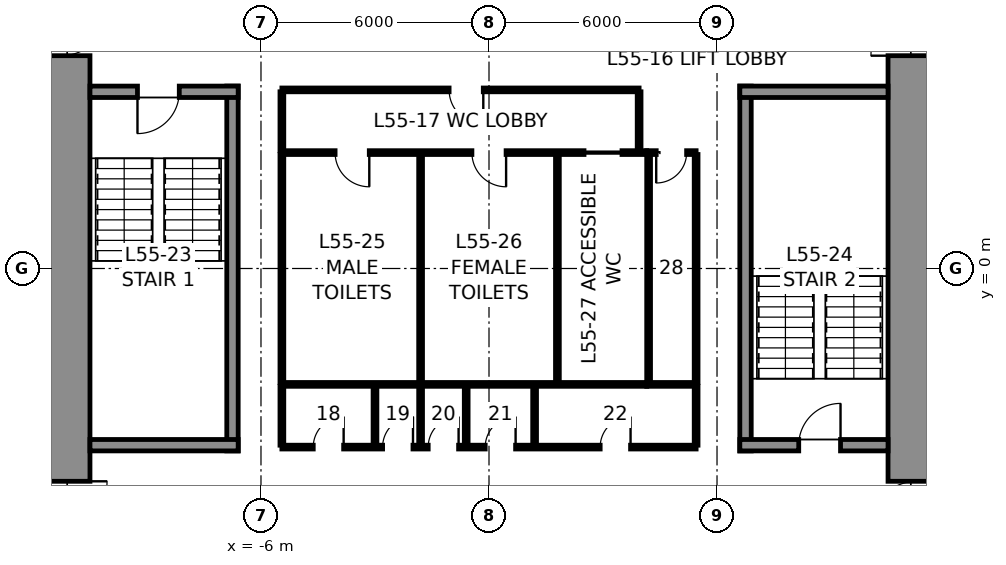
"""IFC4 building model, lengths in metres.
Left out: names, types, materials, properties, quantities, classifications, styles, units other than length and angle.
Written with IfcOpenShell. Run it as: python <this file> out.ifc"""

import sys

from ifc_helpers import new_model, si_unit, direction, frame, frame_2d, origin, place, context, subcontext, project, spatial, rectangle, extrude, element, fill, save


model = new_model("IFC4")
c1 = context("Model", 3, precision=1e-05, world=origin(), true_north=direction((0.0, 1.0)))
c2 = subcontext(c1, "Body", "Model", "MODEL_VIEW")
j1 = project(units=[si_unit("LENGTHUNIT", "METRE"), si_unit("PLANEANGLEUNIT", "RADIAN")], contexts=[c1])
p1 = place(None, origin())
s1 = spatial("IfcSite", under=j1, at=p1, CompositionType="ELEMENT")
p2 = place(p1, origin())
s2 = spatial("IfcBuilding", under=s1, at=p2, CompositionType="ELEMENT")
p3 = place(p2, frame((0.0, 0.0, 249.8)))
s3 = spatial("IfcBuildingStorey", under=s2, at=p3, CompositionType="ELEMENT", Elevation=249.8)
p4 = place(p3, frame((11.25, 10.5, 0.0), z_axis=(0.0, 0.0, 1.0), x_axis=(0.0, -1.0, 0.0)))
e1 = element("IfcWall", 1, at=p4, inside=s3, PredefinedType="SHEAR", context=c2, shape_type="SweptSolid", body=[
    extrude(rectangle(XDim=21.0, YDim=1.5, at=frame_2d((10.5, 0.0))), origin(), (0.0, 0.0, 1.0), 4.0),
])
p5 = place(p4, frame((3.7, 0.0, 0.0)))
e2 = element("IfcOpeningElement", 2, at=p5, cuts=e1, PredefinedType="OPENING", context=c2, shape_type="SweptSolid", body=[
    extrude(rectangle(XDim=1.2, YDim=2.3, at=frame_2d((0.6, 1.15))), frame((0.0, 0.76, 0.0), z_axis=(0.0, -1.0, 0.0), x_axis=(1.0, 0.0, 0.0)), (0.0, 0.0, 1.0), 1.52),
])
p6 = place(p4, frame((16.1, 0.0, 0.0)))
e3 = element("IfcOpeningElement", 3, at=p6, cuts=e1, PredefinedType="OPENING", context=c2, shape_type="SweptSolid", body=[
    extrude(rectangle(XDim=1.2, YDim=2.3, at=frame_2d((0.6, 1.15))), frame((0.0, 0.76, 0.0), z_axis=(0.0, -1.0, 0.0), x_axis=(1.0, 0.0, 0.0)), (0.0, 0.0, 1.0), 1.52),
])
p7 = place(p3, frame((-11.25, -10.5, 0.0), z_axis=(0.0, 0.0, 1.0), x_axis=(0.0, 1.0, 0.0)))
e4 = element("IfcWall", 4, at=p7, inside=s3, PredefinedType="SHEAR", context=c2, shape_type="SweptSolid", body=[
    extrude(rectangle(XDim=21.0, YDim=1.5, at=frame_2d((10.5, 0.0))), origin(), (0.0, 0.0, 1.0), 4.0),
])
p8 = place(p7, frame((16.1, 0.0, 0.0)))
e5 = element("IfcOpeningElement", 5, at=p8, cuts=e4, PredefinedType="OPENING", context=c2, shape_type="SweptSolid", body=[
    extrude(rectangle(XDim=1.2, YDim=2.3, at=frame_2d((0.6, 1.15))), frame((0.0, 0.76, 0.0), z_axis=(0.0, -1.0, 0.0), x_axis=(1.0, 0.0, 0.0)), (0.0, 0.0, 1.0), 1.52),
])
p9 = place(p7, frame((3.7, 0.0, 0.0)))
e6 = element("IfcOpeningElement", 6, at=p9, cuts=e4, PredefinedType="OPENING", context=c2, shape_type="SweptSolid", body=[
    extrude(rectangle(XDim=1.2, YDim=2.3, at=frame_2d((0.6, 1.15))), frame((0.0, 0.76, 0.0), z_axis=(0.0, -1.0, 0.0), x_axis=(1.0, 0.0, 0.0)), (0.0, 0.0, 1.0), 1.52),
])
p10 = place(p3, frame((-6.75, -4.8, 0.0), z_axis=(0.0, 0.0, 1.0), x_axis=(0.0, 1.0, 0.0)))
e7 = element("IfcWall", 7, at=p10, inside=s3, PredefinedType="SOLIDWALL", context=c2, shape_type="SweptSolid", body=[
    extrude(rectangle(XDim=9.6, YDim=0.3, at=frame_2d((4.8, 0.0))), origin(), (0.0, 0.0, 1.0), 3.75),
])
p11 = place(p3, frame((-10.5, 4.65, 0.0), z_axis=(0.0, 0.0, 1.0), x_axis=(1.0, 0.0, 0.0)))
e8 = element("IfcWall", 8, at=p11, inside=s3, PredefinedType="SOLIDWALL", context=c2, shape_type="SweptSolid", body=[
    extrude(rectangle(XDim=3.9, YDim=0.3, at=frame_2d((1.95, 0.0))), origin(), (0.0, 0.0, 1.0), 3.75),
])
p12 = place(p11, frame((1.25, 0.0, 0.0)))
e9 = element("IfcOpeningElement", 9, at=p12, cuts=e8, PredefinedType="OPENING", context=c2, shape_type="SweptSolid", body=[
    extrude(rectangle(XDim=1.1, YDim=2.3, at=frame_2d((0.55, 1.15))), frame((0.0, 0.16, 0.0), z_axis=(0.0, -1.0, 0.0), x_axis=(1.0, 0.0, 0.0)), (0.0, 0.0, 1.0), 0.32),
])
p13 = place(p3, frame((-6.6, -4.65, 0.0), z_axis=(0.0, 0.0, 1.0), x_axis=(-1.0, 0.0, 0.0)))
e10 = element("IfcWall", 10, at=p13, inside=s3, PredefinedType="SOLIDWALL", context=c2, shape_type="SweptSolid", body=[
    extrude(rectangle(XDim=3.9, YDim=0.3, at=frame_2d((1.95, 0.0))), origin(), (0.0, 0.0, 1.0), 3.75),
])
p14 = place(p3, frame((6.75, -4.8, 0.0), z_axis=(0.0, 0.0, 1.0), x_axis=(0.0, 1.0, 0.0)))
e11 = element("IfcWall", 11, at=p14, inside=s3, PredefinedType="SOLIDWALL", context=c2, shape_type="SweptSolid", body=[
    extrude(rectangle(XDim=9.6, YDim=0.3, at=frame_2d((4.8, 0.0))), origin(), (0.0, 0.0, 1.0), 3.75),
])
p15 = place(p3, frame((6.6, 4.65, 0.0), z_axis=(0.0, 0.0, 1.0), x_axis=(1.0, 0.0, 0.0)))
e12 = element("IfcWall", 12, at=p15, inside=s3, PredefinedType="SOLIDWALL", context=c2, shape_type="SweptSolid", body=[
    extrude(rectangle(XDim=3.9, YDim=0.3, at=frame_2d((1.95, 0.0))), origin(), (0.0, 0.0, 1.0), 3.75),
])
p16 = place(p3, frame((10.5, -4.65, 0.0), z_axis=(0.0, 0.0, 1.0), x_axis=(-1.0, 0.0, 0.0)))
e13 = element("IfcWall", 13, at=p16, inside=s3, PredefinedType="SOLIDWALL", context=c2, shape_type="SweptSolid", body=[
    extrude(rectangle(XDim=3.9, YDim=0.3, at=frame_2d((1.95, 0.0))), origin(), (0.0, 0.0, 1.0), 3.75),
])
p17 = place(p16, frame((1.25, 0.0, 0.0)))
e14 = element("IfcOpeningElement", 14, at=p17, cuts=e13, PredefinedType="OPENING", context=c2, shape_type="SweptSolid", body=[
    extrude(rectangle(XDim=1.1, YDim=2.3, at=frame_2d((0.55, 1.15))), frame((0.0, 0.16, 0.0), z_axis=(0.0, -1.0, 0.0), x_axis=(1.0, 0.0, 0.0)), (0.0, 0.0, 1.0), 0.32),
])
p18 = place(p3, frame((-5.45, 3.05, 0.0), z_axis=(0.0, 0.0, 1.0), x_axis=(1.0, 0.0, 0.0)))
e15 = element("IfcWall", 15, at=p18, inside=s3, PredefinedType="PARTITIONING", context=c2, shape_type="SweptSolid", body=[
    extrude(rectangle(XDim=9.6, YDim=0.1, at=frame_2d((4.8, 0.0))), origin(), (0.0, 0.0, 1.0), 3.75),
])
p19 = place(p18, frame((1.4, 0.0, 0.0)))
e16 = element("IfcOpeningElement", 16, at=p19, cuts=e15, PredefinedType="OPENING", context=c2, shape_type="SweptSolid", body=[
    extrude(rectangle(XDim=0.9, YDim=2.3, at=frame_2d((0.45, 1.15))), frame((0.0, 0.06, 0.0), z_axis=(0.0, -1.0, 0.0), x_axis=(1.0, 0.0, 0.0)), (0.0, 0.0, 1.0), 0.12),
])
p20 = place(p18, frame((5.0, 0.0, 0.0)))
e17 = element("IfcOpeningElement", 17, at=p20, cuts=e15, PredefinedType="OPENING", context=c2, shape_type="SweptSolid", body=[
    extrude(rectangle(XDim=0.9, YDim=2.3, at=frame_2d((0.45, 1.15))), frame((0.0, 0.06, 0.0), z_axis=(0.0, -1.0, 0.0), x_axis=(1.0, 0.0, 0.0)), (0.0, 0.0, 1.0), 0.12),
])
p21 = place(p18, frame((7.95, 0.0, 0.0)))
e18 = element("IfcOpeningElement", 18, at=p21, cuts=e15, PredefinedType="OPENING", context=c2, shape_type="SweptSolid", body=[
    extrude(rectangle(XDim=1.0, YDim=2.3, at=frame_2d((0.5, 1.15))), frame((0.0, 0.06, 0.0), z_axis=(0.0, -1.0, 0.0), x_axis=(1.0, 0.0, 0.0)), (0.0, 0.0, 1.0), 0.12),
])
p22 = place(p3, frame((4.15, 3.05, 0.0), z_axis=(0.0, 0.0, 1.0), x_axis=(1.0, 0.0, 0.0)))
e19 = element("IfcWall", 19, at=p22, inside=s3, PredefinedType="PARTITIONING", context=c2, shape_type="SweptSolid", body=[
    extrude(rectangle(XDim=1.3, YDim=0.1, at=frame_2d((0.65, 0.0))), origin(), (0.0, 0.0, 1.0), 3.75),
])
p23 = place(p22, frame((0.25, 0.0, 0.0)))
e20 = element("IfcOpeningElement", 20, at=p23, cuts=e19, PredefinedType="OPENING", context=c2, shape_type="SweptSolid", body=[
    extrude(rectangle(XDim=0.8, YDim=2.3, at=frame_2d((0.4, 1.15))), frame((0.0, 0.06, 0.0), z_axis=(0.0, -1.0, 0.0), x_axis=(1.0, 0.0, 0.0)), (0.0, 0.0, 1.0), 0.12),
])
p24 = place(p3, frame((4.15, -3.05, 0.0), z_axis=(0.0, 0.0, 1.0), x_axis=(-1.0, 0.0, 0.0)))
e21 = element("IfcWall", 21, at=p24, inside=s3, PredefinedType="PARTITIONING", context=c2, shape_type="SweptSolid", body=[
    extrude(rectangle(XDim=9.6, YDim=0.1, at=frame_2d((4.8, 0.0))), origin(), (0.0, 0.0, 1.0), 3.75),
])
p25 = place(p3, frame((5.45, -3.05, 0.0), z_axis=(0.0, 0.0, 1.0), x_axis=(-1.0, 0.0, 0.0)))
e22 = element("IfcWall", 22, at=p25, inside=s3, PredefinedType="PARTITIONING", context=c2, shape_type="SweptSolid", body=[
    extrude(rectangle(XDim=1.3, YDim=0.1, at=frame_2d((0.65, 0.0))), origin(), (0.0, 0.0, 1.0), 3.75),
])
for number, where, z_axis, x_axis in (
    (23, (5.45, 3.0, 0.0), (0.0, 0.0, 1.0), (0.0, -1.0, 0.0)),
    (24, (-5.45, -3.0, 0.0), (0.0, 0.0, 1.0), (0.0, 1.0, 0.0)),
    (25, (-1.8, -3.0, 0.0), (0.0, 0.0, 1.0), (0.0, 1.0, 0.0)),
    (26, (1.8, -3.0, 0.0), (0.0, 0.0, 1.0), (0.0, 1.0, 0.0)),
    (27, (4.2, -3.0, 0.0), (0.0, 0.0, 1.0), (0.0, 1.0, 0.0)),
):
    element("IfcWall", number, at=place(p3, frame(where, z_axis=z_axis, x_axis=x_axis)), inside=s3, PredefinedType="PARTITIONING", context=c2, shape_type="SweptSolid", body=[
        extrude(rectangle(XDim=6.0, YDim=0.1, at=frame_2d((3.0, 0.0))), origin(), (0.0, 0.0, 1.0), 3.75),
    ])
p26 = place(p3, frame((-5.45, 4.7, 0.0), z_axis=(0.0, 0.0, 1.0), x_axis=(1.0, 0.0, 0.0)))
e28 = element("IfcWall", 28, at=p26, inside=s3, PredefinedType="PARTITIONING", context=c2, shape_type="SweptSolid", body=[
    extrude(rectangle(XDim=9.4, YDim=0.1, at=frame_2d((4.7, 0.0))), origin(), (0.0, 0.0, 1.0), 3.75),
])
p27 = place(p26, frame((4.4, 0.0, 0.0)))
e29 = element("IfcOpeningElement", 29, at=p27, cuts=e28, PredefinedType="OPENING", context=c2, shape_type="SweptSolid", body=[
    extrude(rectangle(XDim=0.9, YDim=2.3, at=frame_2d((0.45, 1.15))), frame((0.0, 0.06, 0.0), z_axis=(0.0, -1.0, 0.0), x_axis=(1.0, 0.0, 0.0)), (0.0, 0.0, 1.0), 0.12),
])
for number, where, z_axis, x_axis in (
    (30, (-5.45, 3.1, 0.0), (0.0, 0.0, 1.0), (0.0, 1.0, 0.0)),
    (31, (3.95, 3.1, 0.0), (0.0, 0.0, 1.0), (0.0, 1.0, 0.0)),
):
    element("IfcWall", number, at=place(p3, frame(where, z_axis=z_axis, x_axis=x_axis)), inside=s3, PredefinedType="PARTITIONING", context=c2, shape_type="SweptSolid", body=[
        extrude(rectangle(XDim=1.55, YDim=0.1, at=frame_2d((0.775, 0.0))), origin(), (0.0, 0.0, 1.0), 3.75),
    ])
p28 = place(p3, frame((5.45, -4.7, 0.0), z_axis=(0.0, 0.0, 1.0), x_axis=(-1.0, 0.0, 0.0)))
e32 = element("IfcWall", 32, at=p28, inside=s3, PredefinedType="PARTITIONING", context=c2, shape_type="SweptSolid", body=[
    extrude(rectangle(XDim=10.9, YDim=0.1, at=frame_2d((5.45, 0.0))), origin(), (0.0, 0.0, 1.0), 3.75),
])
p29 = place(p28, frame((9.275, 0.0, 0.0)))
e33 = element("IfcOpeningElement", 33, at=p29, cuts=e32, PredefinedType="OPENING", context=c2, shape_type="SweptSolid", body=[
    extrude(rectangle(XDim=0.8, YDim=2.3, at=frame_2d((0.4, 1.15))), frame((0.0, 0.06, 0.0), z_axis=(0.0, -1.0, 0.0), x_axis=(1.0, 0.0, 0.0)), (0.0, 0.0, 1.0), 0.12),
])
p30 = place(p28, frame((7.45, 0.0, 0.0)))
e34 = element("IfcOpeningElement", 34, at=p30, cuts=e32, PredefinedType="OPENING", context=c2, shape_type="SweptSolid", body=[
    extrude(rectangle(XDim=0.8, YDim=2.3, at=frame_2d((0.4, 1.15))), frame((0.0, 0.06, 0.0), z_axis=(0.0, -1.0, 0.0), x_axis=(1.0, 0.0, 0.0)), (0.0, 0.0, 1.0), 0.12),
])
p31 = place(p28, frame((6.25, 0.0, 0.0)))
e35 = element("IfcOpeningElement", 35, at=p31, cuts=e32, PredefinedType="OPENING", context=c2, shape_type="SweptSolid", body=[
    extrude(rectangle(XDim=0.8, YDim=2.3, at=frame_2d((0.4, 1.15))), frame((0.0, 0.06, 0.0), z_axis=(0.0, -1.0, 0.0), x_axis=(1.0, 0.0, 0.0)), (0.0, 0.0, 1.0), 0.12),
])
p32 = place(p28, frame((4.75, 0.0, 0.0)))
e36 = element("IfcOpeningElement", 36, at=p32, cuts=e32, PredefinedType="OPENING", context=c2, shape_type="SweptSolid", body=[
    extrude(rectangle(XDim=0.8, YDim=2.3, at=frame_2d((0.4, 1.15))), frame((0.0, 0.06, 0.0), z_axis=(0.0, -1.0, 0.0), x_axis=(1.0, 0.0, 0.0)), (0.0, 0.0, 1.0), 0.12),
])
p33 = place(p28, frame((1.725, 0.0, 0.0)))
e37 = element("IfcOpeningElement", 37, at=p33, cuts=e32, PredefinedType="OPENING", context=c2, shape_type="SweptSolid", body=[
    extrude(rectangle(XDim=0.8, YDim=2.3, at=frame_2d((0.4, 1.15))), frame((0.0, 0.06, 0.0), z_axis=(0.0, -1.0, 0.0), x_axis=(1.0, 0.0, 0.0)), (0.0, 0.0, 1.0), 0.12),
])
for number, where, z_axis, x_axis in (
    (38, (-5.45, -3.1, 0.0), (0.0, 0.0, 1.0), (0.0, -1.0, 0.0)),
    (39, (5.45, -3.1, 0.0), (0.0, 0.0, 1.0), (0.0, -1.0, 0.0)),
    (40, (-3.0, -3.1, 0.0), (0.0, 0.0, 1.0), (0.0, -1.0, 0.0)),
    (41, (-1.8, -3.1, 0.0), (0.0, 0.0, 1.0), (0.0, -1.0, 0.0)),
    (42, (-0.6, -3.1, 0.0), (0.0, 0.0, 1.0), (0.0, -1.0, 0.0)),
    (43, (1.2, -3.1, 0.0), (0.0, 0.0, 1.0), (0.0, -1.0, 0.0)),
):
    element("IfcWall", number, at=place(p3, frame(where, z_axis=z_axis, x_axis=x_axis)), inside=s3, PredefinedType="PARTITIONING", context=c2, shape_type="SweptSolid", body=[
        extrude(rectangle(XDim=1.55, YDim=0.1, at=frame_2d((0.775, 0.0))), origin(), (0.0, 0.0, 1.0), 3.75),
    ])
p34 = place(p12, frame((1.1, 0.0, 0.0), z_axis=(0.0, 0.0, 1.0), x_axis=(-1.0, 0.0, 0.0)))
e44 = element("IfcDoor", 44, at=p34, inside=s3, OperationType="SINGLE_SWING_RIGHT", PredefinedType="DOOR", context=c2, shape_type="SweptSolid", body=[
    extrude(rectangle(XDim=1.1, YDim=2.3, at=frame_2d((0.55, 1.15))), frame((0.0, 0.025, 0.0), z_axis=(0.0, -1.0, 0.0), x_axis=(1.0, 0.0, 0.0)), (0.0, 0.0, 1.0), 0.05),
])
fill(e9, e44)
p35 = place(p17, frame((1.1, 0.0, 0.0), z_axis=(0.0, 0.0, 1.0), x_axis=(-1.0, 0.0, 0.0)))
e45 = element("IfcDoor", 45, at=p35, inside=s3, OperationType="SINGLE_SWING_RIGHT", PredefinedType="DOOR", context=c2, shape_type="SweptSolid", body=[
    extrude(rectangle(XDim=1.1, YDim=2.3, at=frame_2d((0.55, 1.15))), frame((0.0, 0.025, 0.0), z_axis=(0.0, -1.0, 0.0), x_axis=(1.0, 0.0, 0.0)), (0.0, 0.0, 1.0), 0.05),
])
fill(e14, e45)
p36 = place(p19, frame((0.9, 0.0, 0.0), z_axis=(0.0, 0.0, 1.0), x_axis=(-1.0, 0.0, 0.0)))
e46 = element("IfcDoor", 46, at=p36, inside=s3, OperationType="SINGLE_SWING_LEFT", PredefinedType="DOOR", context=c2, shape_type="SweptSolid", body=[
    extrude(rectangle(XDim=0.9, YDim=2.3, at=frame_2d((0.45, 1.15))), frame((0.0, 0.025, 0.0), z_axis=(0.0, -1.0, 0.0), x_axis=(1.0, 0.0, 0.0)), (0.0, 0.0, 1.0), 0.05),
])
fill(e16, e46)
p37 = place(p20, frame((0.9, 0.0, 0.0), z_axis=(0.0, 0.0, 1.0), x_axis=(-1.0, 0.0, 0.0)))
e47 = element("IfcDoor", 47, at=p37, inside=s3, OperationType="SINGLE_SWING_LEFT", PredefinedType="DOOR", context=c2, shape_type="SweptSolid", body=[
    extrude(rectangle(XDim=0.9, YDim=2.3, at=frame_2d((0.45, 1.15))), frame((0.0, 0.025, 0.0), z_axis=(0.0, -1.0, 0.0), x_axis=(1.0, 0.0, 0.0)), (0.0, 0.0, 1.0), 0.05),
])
fill(e17, e47)
p38 = place(p21, frame((1.0, 0.0, 0.0), z_axis=(0.0, 0.0, 1.0), x_axis=(-1.0, 0.0, 0.0)))
e48 = element("IfcDoor", 48, at=p38, inside=s3, OperationType="SLIDING_TO_LEFT", PredefinedType="DOOR", context=c2, shape_type="SweptSolid", body=[
    extrude(rectangle(XDim=1.0, YDim=2.3, at=frame_2d((0.5, 1.15))), frame((0.0, 0.025, 0.0), z_axis=(0.0, -1.0, 0.0), x_axis=(1.0, 0.0, 0.0)), (0.0, 0.0, 1.0), 0.05),
])
fill(e18, e48)
p39 = place(p23, frame((0.8, 0.0, 0.0), z_axis=(0.0, 0.0, 1.0), x_axis=(-1.0, 0.0, 0.0)))
e49 = element("IfcDoor", 49, at=p39, inside=s3, OperationType="SINGLE_SWING_RIGHT", PredefinedType="DOOR", context=c2, shape_type="SweptSolid", body=[
    extrude(rectangle(XDim=0.8, YDim=2.3, at=frame_2d((0.4, 1.15))), frame((0.0, 0.025, 0.0), z_axis=(0.0, -1.0, 0.0), x_axis=(1.0, 0.0, 0.0)), (0.0, 0.0, 1.0), 0.05),
])
fill(e20, e49)
p40 = place(p27, frame((0.9, 0.0, 0.0), z_axis=(0.0, 0.0, 1.0), x_axis=(-1.0, 0.0, 0.0)))
e50 = element("IfcDoor", 50, at=p40, inside=s3, OperationType="SINGLE_SWING_LEFT", PredefinedType="DOOR", context=c2, shape_type="SweptSolid", body=[
    extrude(rectangle(XDim=0.9, YDim=2.3, at=frame_2d((0.45, 1.15))), frame((0.0, 0.025, 0.0), z_axis=(0.0, -1.0, 0.0), x_axis=(1.0, 0.0, 0.0)), (0.0, 0.0, 1.0), 0.05),
])
fill(e29, e50)
p41 = place(p29, frame((0.8, 0.0, 0.0), z_axis=(0.0, 0.0, 1.0), x_axis=(-1.0, 0.0, 0.0)))
e51 = element("IfcDoor", 51, at=p41, inside=s3, OperationType="SINGLE_SWING_RIGHT", PredefinedType="DOOR", context=c2, shape_type="SweptSolid", body=[
    extrude(rectangle(XDim=0.8, YDim=2.3, at=frame_2d((0.4, 1.15))), frame((0.0, 0.025, 0.0), z_axis=(0.0, -1.0, 0.0), x_axis=(1.0, 0.0, 0.0)), (0.0, 0.0, 1.0), 0.05),
])
fill(e33, e51)
p42 = place(p30, frame((0.8, 0.0, 0.0), z_axis=(0.0, 0.0, 1.0), x_axis=(-1.0, 0.0, 0.0)))
e52 = element("IfcDoor", 52, at=p42, inside=s3, OperationType="SINGLE_SWING_RIGHT", PredefinedType="DOOR", context=c2, shape_type="SweptSolid", body=[
    extrude(rectangle(XDim=0.8, YDim=2.3, at=frame_2d((0.4, 1.15))), frame((0.0, 0.025, 0.0), z_axis=(0.0, -1.0, 0.0), x_axis=(1.0, 0.0, 0.0)), (0.0, 0.0, 1.0), 0.05),
])
fill(e34, e52)
p43 = place(p31, frame((0.8, 0.0, 0.0), z_axis=(0.0, 0.0, 1.0), x_axis=(-1.0, 0.0, 0.0)))
e53 = element("IfcDoor", 53, at=p43, inside=s3, OperationType="SINGLE_SWING_RIGHT", PredefinedType="DOOR", context=c2, shape_type="SweptSolid", body=[
    extrude(rectangle(XDim=0.8, YDim=2.3, at=frame_2d((0.4, 1.15))), frame((0.0, 0.025, 0.0), z_axis=(0.0, -1.0, 0.0), x_axis=(1.0, 0.0, 0.0)), (0.0, 0.0, 1.0), 0.05),
])
fill(e35, e53)
p44 = place(p32, frame((0.8, 0.0, 0.0), z_axis=(0.0, 0.0, 1.0), x_axis=(-1.0, 0.0, 0.0)))
e54 = element("IfcDoor", 54, at=p44, inside=s3, OperationType="SINGLE_SWING_RIGHT", PredefinedType="DOOR", context=c2, shape_type="SweptSolid", body=[
    extrude(rectangle(XDim=0.8, YDim=2.3, at=frame_2d((0.4, 1.15))), frame((0.0, 0.025, 0.0), z_axis=(0.0, -1.0, 0.0), x_axis=(1.0, 0.0, 0.0)), (0.0, 0.0, 1.0), 0.05),
])
fill(e36, e54)
p45 = place(p33, frame((0.8, 0.0, 0.0), z_axis=(0.0, 0.0, 1.0), x_axis=(-1.0, 0.0, 0.0)))
e55 = element("IfcDoor", 55, at=p45, inside=s3, OperationType="SINGLE_SWING_RIGHT", PredefinedType="DOOR", context=c2, shape_type="SweptSolid", body=[
    extrude(rectangle(XDim=0.8, YDim=2.3, at=frame_2d((0.4, 1.15))), frame((0.0, 0.025, 0.0), z_axis=(0.0, -1.0, 0.0), x_axis=(1.0, 0.0, 0.0)), (0.0, 0.0, 1.0), 0.05),
])
fill(e37, e55)
p46 = place(p8, frame((1.2, 0.0, 0.0), z_axis=(0.0, 0.0, 1.0), x_axis=(-1.0, 0.0, 0.0)))
e56 = element("IfcDoor", 56, at=p46, inside=s3, OperationType="SINGLE_SWING_LEFT", PredefinedType="DOOR", context=c2, shape_type="SweptSolid", body=[
    extrude(rectangle(XDim=1.2, YDim=2.3, at=frame_2d((0.6, 1.15))), frame((0.0, 0.025, 0.0), z_axis=(0.0, -1.0, 0.0), x_axis=(1.0, 0.0, 0.0)), (0.0, 0.0, 1.0), 0.05),
])
fill(e5, e56)
p47 = place(p9, frame((1.2, 0.0, 0.0), z_axis=(0.0, 0.0, 1.0), x_axis=(-1.0, 0.0, 0.0)))
e57 = element("IfcDoor", 57, at=p47, inside=s3, OperationType="SINGLE_SWING_LEFT", PredefinedType="DOOR", context=c2, shape_type="SweptSolid", body=[
    extrude(rectangle(XDim=1.2, YDim=2.3, at=frame_2d((0.6, 1.15))), frame((0.0, 0.025, 0.0), z_axis=(0.0, -1.0, 0.0), x_axis=(1.0, 0.0, 0.0)), (0.0, 0.0, 1.0), 0.05),
])
fill(e6, e57)
p48 = place(p5, frame((1.2, 0.0, 0.0), z_axis=(0.0, 0.0, 1.0), x_axis=(-1.0, 0.0, 0.0)))
e58 = element("IfcDoor", 58, at=p48, inside=s3, OperationType="SINGLE_SWING_LEFT", PredefinedType="DOOR", context=c2, shape_type="SweptSolid", body=[
    extrude(rectangle(XDim=1.2, YDim=2.3, at=frame_2d((0.6, 1.15))), frame((0.0, 0.025, 0.0), z_axis=(0.0, -1.0, 0.0), x_axis=(1.0, 0.0, 0.0)), (0.0, 0.0, 1.0), 0.05),
])
fill(e2, e58)
p49 = place(p6, frame((1.2, 0.0, 0.0), z_axis=(0.0, 0.0, 1.0), x_axis=(-1.0, 0.0, 0.0)))
e59 = element("IfcDoor", 59, at=p49, inside=s3, OperationType="SINGLE_SWING_LEFT", PredefinedType="DOOR", context=c2, shape_type="SweptSolid", body=[
    extrude(rectangle(XDim=1.2, YDim=2.3, at=frame_2d((0.6, 1.15))), frame((0.0, 0.025, 0.0), z_axis=(0.0, -1.0, 0.0), x_axis=(1.0, 0.0, 0.0)), (0.0, 0.0, 1.0), 0.05),
])
fill(e3, e59)
save(model, sys.argv[1])
